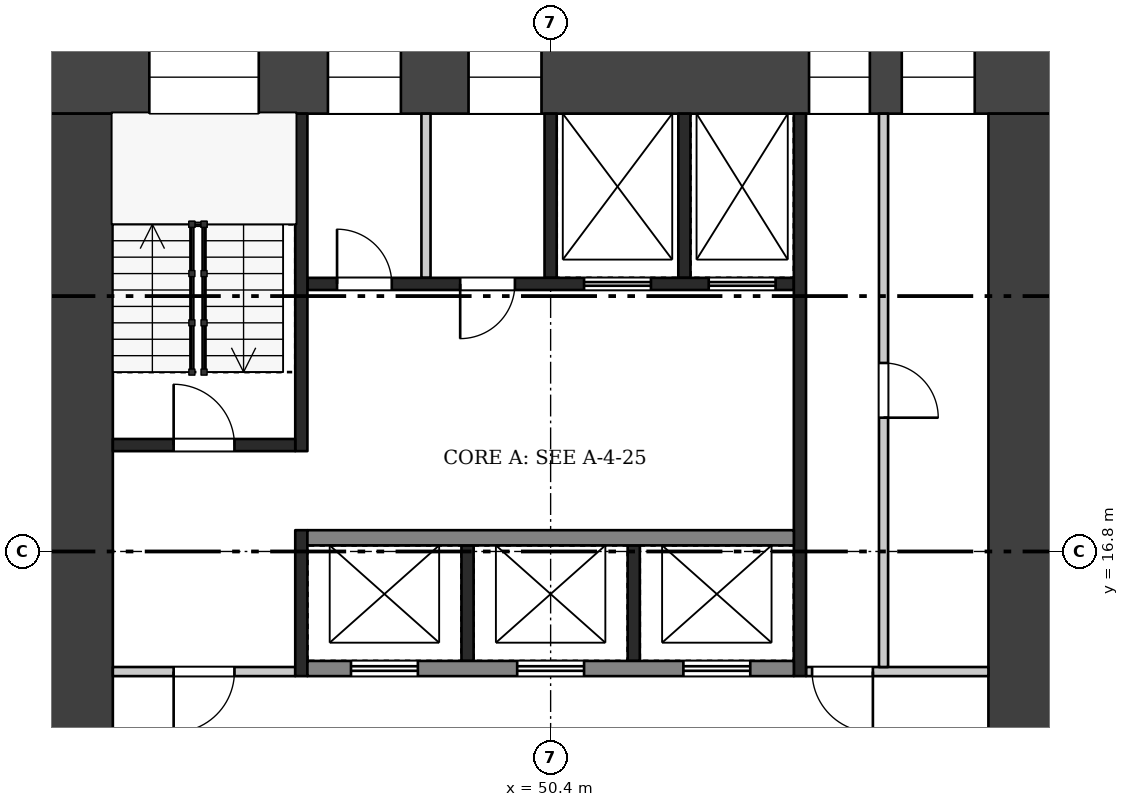
"""IFC4 building model, lengths in metres.
Left out: names, types, materials, properties, quantities, classifications, styles, units other than length and angle.
Written with IfcOpenShell. Run it as: python <this file> out.ifc"""

import sys

from ifc_helpers import new_model, si_unit, direction, frame, frame_2d, origin, place, context, subcontext, project, spatial, rectangle, extrude, element, fill, save


model = new_model("IFC4")
c1 = context("Model", 3, precision=1e-05, world=origin(), true_north=direction((0.0, 1.0)))
c2 = subcontext(c1, "Body", "Model", "MODEL_VIEW")
j1 = project(units=[si_unit("LENGTHUNIT", "METRE"), si_unit("PLANEANGLEUNIT", "RADIAN")], contexts=[c1])
p1 = place(None, origin())
s1 = spatial("IfcSite", under=j1, at=p1, CompositionType="ELEMENT")
p2 = place(p1, origin())
s2 = spatial("IfcBuilding", under=s1, at=p2, CompositionType="ELEMENT")
p3 = place(p2, frame((0.0, 0.0, 168.7)))
s3 = spatial("IfcBuildingStorey", under=s2, at=p3, CompositionType="ELEMENT", Elevation=168.7)
p4 = place(p3, frame((42.0, 24.6, 0.0), z_axis=(0.0, 0.0, 1.0), x_axis=(1.0, 0.0, 0.0)))
e1 = element("IfcWall", 1, at=p4, inside=s3, PredefinedType="SHEAR", context=c2, shape_type="SweptSolid", body=[
    extrude(rectangle(XDim=16.8, YDim=1.2, at=frame_2d((8.4, 0.0))), origin(), (0.0, 0.0, 1.0), 3.22),
])
p5 = place(p4, frame((1.8, 0.0, 0.5)))
e2 = element("IfcOpeningElement", 2, at=p5, cuts=e1, PredefinedType="OPENING", context=c2, shape_type="SweptSolid", body=[
    extrude(rectangle(XDim=1.8, YDim=2.4, at=frame_2d((0.9, 1.2))), frame((0.0, 0.61, 0.0), z_axis=(0.0, -1.0, 0.0), x_axis=(1.0, 0.0, 0.0)), (0.0, 0.0, 1.0), 1.22),
])
p6 = place(p4, frame((4.738, 0.0, 1.6)))
e3 = element("IfcOpeningElement", 3, at=p6, cuts=e1, PredefinedType="OPENING", context=c2, shape_type="SweptSolid", body=[
    extrude(rectangle(XDim=1.2, YDim=1.2, at=frame_2d((0.6, 0.6))), frame((0.0, 0.61, 0.0), z_axis=(0.0, -1.0, 0.0), x_axis=(1.0, 0.0, 0.0)), (0.0, 0.0, 1.0), 1.22),
])
p7 = place(p4, frame((7.05, 0.0, 1.6)))
e4 = element("IfcOpeningElement", 4, at=p7, cuts=e1, PredefinedType="OPENING", context=c2, shape_type="SweptSolid", body=[
    extrude(rectangle(XDim=1.2, YDim=1.2, at=frame_2d((0.6, 0.6))), frame((0.0, 0.61, 0.0), z_axis=(0.0, -1.0, 0.0), x_axis=(1.0, 0.0, 0.0)), (0.0, 0.0, 1.0), 1.22),
])
p8 = place(p4, frame((12.65, 0.0, 0.6)))
e5 = element("IfcOpeningElement", 5, at=p8, cuts=e1, PredefinedType="OPENING", context=c2, shape_type="SweptSolid", body=[
    extrude(rectangle(XDim=1.0, YDim=2.1, at=frame_2d((0.5, 1.05))), frame((0.0, 0.61, 0.0), z_axis=(0.0, -1.0, 0.0), x_axis=(1.0, 0.0, 0.0)), (0.0, 0.0, 1.0), 1.22),
])
p9 = place(p4, frame((14.175, 0.0, 1.6)))
e6 = element("IfcOpeningElement", 6, at=p9, cuts=e1, PredefinedType="OPENING", context=c2, shape_type="SweptSolid", body=[
    extrude(rectangle(XDim=1.2, YDim=1.2, at=frame_2d((0.6, 0.6))), frame((0.0, 0.61, 0.0), z_axis=(0.0, -1.0, 0.0), x_axis=(1.0, 0.0, 0.0)), (0.0, 0.0, 1.0), 1.22),
])
p10 = place(p3, frame((42.6, 9.6, 0.0), z_axis=(0.0, 0.0, 1.0), x_axis=(0.0, 1.0, 0.0)))
e7 = element("IfcWall", 7, at=p10, inside=s3, PredefinedType="SHEAR", context=c2, shape_type="SweptSolid", body=[
    extrude(rectangle(XDim=14.4, YDim=1.2, at=frame_2d((7.2, 0.0))), origin(), (0.0, 0.0, 1.0), 3.22),
])
p11 = place(p10, frame((2.1, 0.0, 0.0)))
e8 = element("IfcOpeningElement", 8, at=p11, cuts=e7, PredefinedType="OPENING", context=c2, shape_type="SweptSolid", body=[
    extrude(rectangle(XDim=1.8, YDim=2.1, at=frame_2d((0.9, 1.05))), frame((0.0, 0.61, 0.0), z_axis=(0.0, -1.0, 0.0), x_axis=(1.0, 0.0, 0.0)), (0.0, 0.0, 1.0), 1.22),
])
p12 = place(p3, frame((58.2, 9.6, 0.0), z_axis=(0.0, 0.0, 1.0), x_axis=(0.0, 1.0, 0.0)))
e9 = element("IfcWall", 9, at=p12, inside=s3, PredefinedType="SHEAR", context=c2, shape_type="SweptSolid", body=[
    extrude(rectangle(XDim=14.4, YDim=1.2, at=frame_2d((7.2, 0.0))), origin(), (0.0, 0.0, 1.0), 3.22),
])
p13 = place(p12, frame((2.1, 0.0, 0.0)))
e10 = element("IfcOpeningElement", 10, at=p13, cuts=e9, PredefinedType="OPENING", context=c2, shape_type="SweptSolid", body=[
    extrude(rectangle(XDim=1.8, YDim=2.1, at=frame_2d((0.9, 1.05))), frame((0.0, 0.61, 0.0), z_axis=(0.0, -1.0, 0.0), x_axis=(1.0, 0.0, 0.0)), (0.0, 0.0, 1.0), 1.22),
])
for number, where, z_axis, x_axis in (
    (11, (49.033, 15.0, 0.0), (0.0, 0.0, 1.0), (0.0, 1.0, 0.0)),
    (12, (51.767, 15.0, 0.0), (0.0, 0.0, 1.0), (0.0, 1.0, 0.0)),
):
    element("IfcWall", number, at=place(p3, frame(where, z_axis=z_axis, x_axis=x_axis)), inside=s3, PredefinedType="SHEAR", context=c2, shape_type="SweptSolid", body=[
        extrude(rectangle(XDim=1.9, YDim=0.2, at=frame_2d((0.95, 0.0))), origin(), (0.0, 0.0, 1.0), 3.22),
    ])
p14 = place(p3, frame((46.4, 14.875, 0.0), z_axis=(0.0, 0.0, 1.0), x_axis=(1.0, 0.0, 0.0)))
e13 = element("IfcWall", 13, at=p14, inside=s3, PredefinedType="SHEAR", context=c2, shape_type="SweptSolid", body=[
    extrude(rectangle(XDim=8.0, YDim=0.25, at=frame_2d((4.0, 0.0))), origin(), (0.0, 0.0, 1.0), 3.22),
])
p15 = place(p14, frame((0.717, 0.0, 0.0)))
e14 = element("IfcOpeningElement", 14, at=p15, cuts=e13, PredefinedType="OPENING", context=c2, shape_type="SweptSolid", body=[
    extrude(rectangle(XDim=1.1, YDim=2.1, at=frame_2d((0.55, 1.05))), frame((0.0, 0.135, 0.0), z_axis=(0.0, -1.0, 0.0), x_axis=(1.0, 0.0, 0.0)), (0.0, 0.0, 1.0), 0.27),
])
p16 = place(p14, frame((3.45, 0.0, 0.0)))
e15 = element("IfcOpeningElement", 15, at=p16, cuts=e13, PredefinedType="OPENING", context=c2, shape_type="SweptSolid", body=[
    extrude(rectangle(XDim=1.1, YDim=2.1, at=frame_2d((0.55, 1.05))), frame((0.0, 0.135, 0.0), z_axis=(0.0, -1.0, 0.0), x_axis=(1.0, 0.0, 0.0)), (0.0, 0.0, 1.0), 0.27),
])
p17 = place(p14, frame((6.183, 0.0, 0.0)))
e16 = element("IfcOpeningElement", 16, at=p17, cuts=e13, PredefinedType="OPENING", context=c2, shape_type="SweptSolid", body=[
    extrude(rectangle(XDim=1.1, YDim=2.1, at=frame_2d((0.55, 1.05))), frame((0.0, 0.135, 0.0), z_axis=(0.0, -1.0, 0.0), x_axis=(1.0, 0.0, 0.0)), (0.0, 0.0, 1.0), 0.27),
])
p18 = place(p3, frame((46.4, 17.025, 0.0), z_axis=(0.0, 0.0, 1.0), x_axis=(1.0, 0.0, 0.0)))
e17 = element("IfcWall", 17, at=p18, inside=s3, PredefinedType="SHEAR", context=c2, shape_type="SweptSolid", body=[
    extrude(rectangle(XDim=8.0, YDim=0.25, at=frame_2d((4.0, 0.0))), origin(), (0.0, 0.0, 1.0), 3.22),
])
for number, where, z_axis, x_axis in (
    (18, (50.4, 21.3, 0.0), (0.0, 0.0, 1.0), (0.0, 1.0, 0.0)),
    (19, (52.6, 21.3, 0.0), (0.0, 0.0, 1.0), (0.0, 1.0, 0.0)),
):
    element("IfcWall", number, at=place(p3, frame(where, z_axis=z_axis, x_axis=x_axis)), inside=s3, PredefinedType="SHEAR", context=c2, shape_type="SweptSolid", body=[
        extrude(rectangle(XDim=2.7, YDim=0.2, at=frame_2d((1.35, 0.0))), origin(), (0.0, 0.0, 1.0), 3.22),
    ])
p19 = place(p3, frame((48.35, 21.3, 0.0), z_axis=(0.0, 0.0, 1.0), x_axis=(0.0, 1.0, 0.0)))
e20 = element("IfcWall", 20, at=p19, inside=s3, PredefinedType="PARTITIONING", context=c2, shape_type="SweptSolid", body=[
    extrude(rectangle(XDim=2.7, YDim=0.15, at=frame_2d((1.35, 0.0))), origin(), (0.0, 0.0, 1.0), 3.22),
])
p20 = place(p3, frame((46.4, 21.2, 0.0), z_axis=(0.0, 0.0, 1.0), x_axis=(1.0, 0.0, 0.0)))
e21 = element("IfcWall", 21, at=p20, inside=s3, PredefinedType="SHEAR", context=c2, shape_type="SweptSolid", body=[
    extrude(rectangle(XDim=8.0, YDim=0.2, at=frame_2d((4.0, 0.0))), origin(), (0.0, 0.0, 1.0), 3.22),
])
p21 = place(p20, frame((0.488, 0.0, 0.0)))
e22 = element("IfcOpeningElement", 22, at=p21, cuts=e21, PredefinedType="OPENING", context=c2, shape_type="SweptSolid", body=[
    extrude(rectangle(XDim=0.9, YDim=2.1, at=frame_2d((0.45, 1.05))), frame((0.0, 0.11, 0.0), z_axis=(0.0, -1.0, 0.0), x_axis=(1.0, 0.0, 0.0)), (0.0, 0.0, 1.0), 0.22),
])
p22 = place(p20, frame((2.512, 0.0, 0.0)))
e23 = element("IfcOpeningElement", 23, at=p22, cuts=e21, PredefinedType="OPENING", context=c2, shape_type="SweptSolid", body=[
    extrude(rectangle(XDim=0.9, YDim=2.1, at=frame_2d((0.45, 1.05))), frame((0.0, 0.11, 0.0), z_axis=(0.0, -1.0, 0.0), x_axis=(1.0, 0.0, 0.0)), (0.0, 0.0, 1.0), 0.22),
])
p23 = place(p20, frame((4.55, 0.0, 0.0)))
e24 = element("IfcOpeningElement", 24, at=p23, cuts=e21, PredefinedType="OPENING", context=c2, shape_type="SweptSolid", body=[
    extrude(rectangle(XDim=1.1, YDim=2.1, at=frame_2d((0.55, 1.05))), frame((0.0, 0.11, 0.0), z_axis=(0.0, -1.0, 0.0), x_axis=(1.0, 0.0, 0.0)), (0.0, 0.0, 1.0), 0.22),
])
p24 = place(p20, frame((6.6, 0.0, 0.0)))
e25 = element("IfcOpeningElement", 25, at=p24, cuts=e21, PredefinedType="OPENING", context=c2, shape_type="SweptSolid", body=[
    extrude(rectangle(XDim=1.1, YDim=2.1, at=frame_2d((0.55, 1.05))), frame((0.0, 0.11, 0.0), z_axis=(0.0, -1.0, 0.0), x_axis=(1.0, 0.0, 0.0)), (0.0, 0.0, 1.0), 0.22),
])
p25 = place(p3, frame((46.3, 14.75, 0.0), z_axis=(0.0, 0.0, 1.0), x_axis=(0.0, 1.0, 0.0)))
e26 = element("IfcWall", 26, at=p25, inside=s3, PredefinedType="SHEAR", context=c2, shape_type="SweptSolid", body=[
    extrude(rectangle(XDim=2.4, YDim=0.2, at=frame_2d((1.2, 0.0))), origin(), (0.0, 0.0, 1.0), 3.22),
])
p26 = place(p3, frame((46.3, 18.45, 0.0), z_axis=(0.0, 0.0, 1.0), x_axis=(0.0, 1.0, 0.0)))
e27 = element("IfcWall", 27, at=p26, inside=s3, PredefinedType="SHEAR", context=c2, shape_type="SweptSolid", body=[
    extrude(rectangle(XDim=5.55, YDim=0.2, at=frame_2d((2.775, 0.0))), origin(), (0.0, 0.0, 1.0), 3.22),
])
p27 = place(p3, frame((43.2, 14.825, 0.0), z_axis=(0.0, 0.0, 1.0), x_axis=(1.0, 0.0, 0.0)))
e28 = element("IfcWall", 28, at=p27, inside=s3, PredefinedType="PARTITIONING", context=c2, shape_type="SweptSolid", body=[
    extrude(rectangle(XDim=3.0, YDim=0.15, at=frame_2d((1.5, 0.0))), origin(), (0.0, 0.0, 1.0), 3.22),
])
p28 = place(p27, frame((1.0, 0.0, 0.0)))
e29 = element("IfcOpeningElement", 29, at=p28, cuts=e28, PredefinedType="OPENING", context=c2, shape_type="SweptSolid", body=[
    extrude(rectangle(XDim=1.0, YDim=2.1, at=frame_2d((0.5, 1.05))), frame((0.0, 0.085, 0.0), z_axis=(0.0, -1.0, 0.0), x_axis=(1.0, 0.0, 0.0)), (0.0, 0.0, 1.0), 0.17),
])
p29 = place(p3, frame((43.2, 18.55, 0.0), z_axis=(0.0, 0.0, 1.0), x_axis=(1.0, 0.0, 0.0)))
e30 = element("IfcWall", 30, at=p29, inside=s3, PredefinedType="SHEAR", context=c2, shape_type="SweptSolid", body=[
    extrude(rectangle(XDim=3.0, YDim=0.2, at=frame_2d((1.5, 0.0))), origin(), (0.0, 0.0, 1.0), 3.22),
])
p30 = place(p29, frame((1.0, 0.0, 0.0)))
e31 = element("IfcOpeningElement", 31, at=p30, cuts=e30, PredefinedType="OPENING", context=c2, shape_type="SweptSolid", body=[
    extrude(rectangle(XDim=1.0, YDim=2.1, at=frame_2d((0.5, 1.05))), frame((0.0, 0.11, 0.0), z_axis=(0.0, -1.0, 0.0), x_axis=(1.0, 0.0, 0.0)), (0.0, 0.0, 1.0), 0.22),
])
p31 = place(p3, frame((54.5, 14.75, 0.0), z_axis=(0.0, 0.0, 1.0), x_axis=(0.0, 1.0, 0.0)))
e32 = element("IfcWall", 32, at=p31, inside=s3, PredefinedType="SHEAR", context=c2, shape_type="SweptSolid", body=[
    extrude(rectangle(XDim=9.25, YDim=0.2, at=frame_2d((4.625, 0.0))), origin(), (0.0, 0.0, 1.0), 3.22),
])
p32 = place(p3, frame((54.6, 14.825, 0.0), z_axis=(0.0, 0.0, 1.0), x_axis=(1.0, 0.0, 0.0)))
e33 = element("IfcWall", 33, at=p32, inside=s3, PredefinedType="PARTITIONING", context=c2, shape_type="SweptSolid", body=[
    extrude(rectangle(XDim=3.0, YDim=0.15, at=frame_2d((1.5, 0.0))), origin(), (0.0, 0.0, 1.0), 3.22),
])
p33 = place(p32, frame((0.1, 0.0, 0.0)))
e34 = element("IfcOpeningElement", 34, at=p33, cuts=e33, PredefinedType="OPENING", context=c2, shape_type="SweptSolid", body=[
    extrude(rectangle(XDim=1.0, YDim=2.1, at=frame_2d((0.5, 1.05))), frame((0.0, 0.085, 0.0), z_axis=(0.0, -1.0, 0.0), x_axis=(1.0, 0.0, 0.0)), (0.0, 0.0, 1.0), 0.17),
])
p34 = place(p3, frame((55.875, 14.9, 0.0), z_axis=(0.0, 0.0, 1.0), x_axis=(0.0, 1.0, 0.0)))
e35 = element("IfcWall", 35, at=p34, inside=s3, PredefinedType="PARTITIONING", context=c2, shape_type="SweptSolid", body=[
    extrude(rectangle(XDim=9.1, YDim=0.15, at=frame_2d((4.55, 0.0))), origin(), (0.0, 0.0, 1.0), 3.22),
])
p35 = place(p34, frame((4.1, 0.0, 0.0)))
e36 = element("IfcOpeningElement", 36, at=p35, cuts=e35, PredefinedType="OPENING", context=c2, shape_type="SweptSolid", body=[
    extrude(rectangle(XDim=0.9, YDim=2.1, at=frame_2d((0.45, 1.05))), frame((0.0, 0.085, 0.0), z_axis=(0.0, -1.0, 0.0), x_axis=(1.0, 0.0, 0.0)), (0.0, 0.0, 1.0), 0.17),
])
p36 = place(p15, origin())
e37 = element("IfcDoor", 37, at=p36, inside=s3, OperationType="DOUBLE_DOOR_SLIDING", PredefinedType="DOOR", context=c2, shape_type="SweptSolid", body=[
    extrude(rectangle(XDim=1.1, YDim=2.1, at=frame_2d((0.55, 1.05))), frame((0.0, 0.025, 0.0), z_axis=(0.0, -1.0, 0.0), x_axis=(1.0, 0.0, 0.0)), (0.0, 0.0, 1.0), 0.05),
])
fill(e14, e37)
p37 = place(p16, origin())
e38 = element("IfcDoor", 38, at=p37, inside=s3, OperationType="DOUBLE_DOOR_SLIDING", PredefinedType="DOOR", context=c2, shape_type="SweptSolid", body=[
    extrude(rectangle(XDim=1.1, YDim=2.1, at=frame_2d((0.55, 1.05))), frame((0.0, 0.025, 0.0), z_axis=(0.0, -1.0, 0.0), x_axis=(1.0, 0.0, 0.0)), (0.0, 0.0, 1.0), 0.05),
])
fill(e15, e38)
p38 = place(p17, origin())
e39 = element("IfcDoor", 39, at=p38, inside=s3, OperationType="DOUBLE_DOOR_SLIDING", PredefinedType="DOOR", context=c2, shape_type="SweptSolid", body=[
    extrude(rectangle(XDim=1.1, YDim=2.1, at=frame_2d((0.55, 1.05))), frame((0.0, 0.025, 0.0), z_axis=(0.0, -1.0, 0.0), x_axis=(1.0, 0.0, 0.0)), (0.0, 0.0, 1.0), 0.05),
])
fill(e16, e39)
p39 = place(p21, origin())
e40 = element("IfcDoor", 40, at=p39, inside=s3, OperationType="SINGLE_SWING_LEFT", PredefinedType="DOOR", context=c2, shape_type="SweptSolid", body=[
    extrude(rectangle(XDim=0.9, YDim=2.1, at=frame_2d((0.45, 1.05))), frame((0.0, 0.025, 0.0), z_axis=(0.0, -1.0, 0.0), x_axis=(1.0, 0.0, 0.0)), (0.0, 0.0, 1.0), 0.05),
])
fill(e22, e40)
p40 = place(p22, frame((0.9, 0.0, 0.0), z_axis=(0.0, 0.0, 1.0), x_axis=(-1.0, 0.0, 0.0)))
e41 = element("IfcDoor", 41, at=p40, inside=s3, OperationType="SINGLE_SWING_RIGHT", PredefinedType="DOOR", context=c2, shape_type="SweptSolid", body=[
    extrude(rectangle(XDim=0.9, YDim=2.1, at=frame_2d((0.45, 1.05))), frame((0.0, 0.025, 0.0), z_axis=(0.0, -1.0, 0.0), x_axis=(1.0, 0.0, 0.0)), (0.0, 0.0, 1.0), 0.05),
])
fill(e23, e41)
p41 = place(p23, origin())
e42 = element("IfcDoor", 42, at=p41, inside=s3, OperationType="DOUBLE_DOOR_SLIDING", PredefinedType="DOOR", context=c2, shape_type="SweptSolid", body=[
    extrude(rectangle(XDim=1.1, YDim=2.1, at=frame_2d((0.55, 1.05))), frame((0.0, 0.025, 0.0), z_axis=(0.0, -1.0, 0.0), x_axis=(1.0, 0.0, 0.0)), (0.0, 0.0, 1.0), 0.05),
])
fill(e24, e42)
p42 = place(p24, origin())
e43 = element("IfcDoor", 43, at=p42, inside=s3, OperationType="DOUBLE_DOOR_SLIDING", PredefinedType="DOOR", context=c2, shape_type="SweptSolid", body=[
    extrude(rectangle(XDim=1.1, YDim=2.1, at=frame_2d((0.55, 1.05))), frame((0.0, 0.025, 0.0), z_axis=(0.0, -1.0, 0.0), x_axis=(1.0, 0.0, 0.0)), (0.0, 0.0, 1.0), 0.05),
])
fill(e25, e43)
p43 = place(p28, frame((1.0, 0.0, 0.0), z_axis=(0.0, 0.0, 1.0), x_axis=(-1.0, 0.0, 0.0)))
e44 = element("IfcDoor", 44, at=p43, inside=s3, OperationType="SINGLE_SWING_RIGHT", PredefinedType="DOOR", context=c2, shape_type="SweptSolid", body=[
    extrude(rectangle(XDim=1.0, YDim=2.1, at=frame_2d((0.5, 1.05))), frame((0.0, 0.025, 0.0), z_axis=(0.0, -1.0, 0.0), x_axis=(1.0, 0.0, 0.0)), (0.0, 0.0, 1.0), 0.05),
])
fill(e29, e44)
p44 = place(p30, origin())
e45 = element("IfcDoor", 45, at=p44, inside=s3, OperationType="SINGLE_SWING_LEFT", PredefinedType="DOOR", context=c2, shape_type="SweptSolid", body=[
    extrude(rectangle(XDim=1.0, YDim=2.1, at=frame_2d((0.5, 1.05))), frame((0.0, 0.025, 0.0), z_axis=(0.0, -1.0, 0.0), x_axis=(1.0, 0.0, 0.0)), (0.0, 0.0, 1.0), 0.05),
])
fill(e31, e45)
p45 = place(p33, frame((1.0, 0.0, 0.0), z_axis=(0.0, 0.0, 1.0), x_axis=(-1.0, 0.0, 0.0)))
e46 = element("IfcDoor", 46, at=p45, inside=s3, OperationType="SINGLE_SWING_LEFT", PredefinedType="DOOR", context=c2, shape_type="SweptSolid", body=[
    extrude(rectangle(XDim=1.0, YDim=2.1, at=frame_2d((0.5, 1.05))), frame((0.0, 0.025, 0.0), z_axis=(0.0, -1.0, 0.0), x_axis=(1.0, 0.0, 0.0)), (0.0, 0.0, 1.0), 0.05),
])
fill(e34, e46)
p46 = place(p35, frame((0.9, 0.0, 0.0), z_axis=(0.0, 0.0, 1.0), x_axis=(-1.0, 0.0, 0.0)))
e47 = element("IfcDoor", 47, at=p46, inside=s3, OperationType="SINGLE_SWING_RIGHT", PredefinedType="DOOR", context=c2, shape_type="SweptSolid", body=[
    extrude(rectangle(XDim=0.9, YDim=2.1, at=frame_2d((0.45, 1.05))), frame((0.0, 0.025, 0.0), z_axis=(0.0, -1.0, 0.0), x_axis=(1.0, 0.0, 0.0)), (0.0, 0.0, 1.0), 0.05),
])
fill(e36, e47)
p47 = place(p5, origin())
e48 = element("IfcWindow", 48, at=p47, inside=s3, PartitioningType="SINGLE_PANEL", PredefinedType="WINDOW", context=c2, shape_type="SweptSolid", body=[
    extrude(rectangle(XDim=1.8, YDim=2.4, at=frame_2d((0.9, 1.2))), frame((0.0, 0.03, 0.0), z_axis=(0.0, -1.0, 0.0), x_axis=(1.0, 0.0, 0.0)), (0.0, 0.0, 1.0), 0.06),
])
fill(e2, e48)
p48 = place(p6, origin())
e49 = element("IfcWindow", 49, at=p48, inside=s3, PartitioningType="SINGLE_PANEL", PredefinedType="WINDOW", context=c2, shape_type="SweptSolid", body=[
    extrude(rectangle(XDim=1.2, YDim=1.2, at=frame_2d((0.6, 0.6))), frame((0.0, 0.03, 0.0), z_axis=(0.0, -1.0, 0.0), x_axis=(1.0, 0.0, 0.0)), (0.0, 0.0, 1.0), 0.06),
])
fill(e3, e49)
p49 = place(p7, origin())
e50 = element("IfcWindow", 50, at=p49, inside=s3, PartitioningType="SINGLE_PANEL", PredefinedType="WINDOW", context=c2, shape_type="SweptSolid", body=[
    extrude(rectangle(XDim=1.2, YDim=1.2, at=frame_2d((0.6, 0.6))), frame((0.0, 0.03, 0.0), z_axis=(0.0, -1.0, 0.0), x_axis=(1.0, 0.0, 0.0)), (0.0, 0.0, 1.0), 0.06),
])
fill(e4, e50)
p50 = place(p8, origin())
e51 = element("IfcWindow", 51, at=p50, inside=s3, PartitioningType="SINGLE_PANEL", PredefinedType="WINDOW", context=c2, shape_type="SweptSolid", body=[
    extrude(rectangle(XDim=1.0, YDim=2.1, at=frame_2d((0.5, 1.05))), frame((0.0, 0.03, 0.0), z_axis=(0.0, -1.0, 0.0), x_axis=(1.0, 0.0, 0.0)), (0.0, 0.0, 1.0), 0.06),
])
fill(e5, e51)
p51 = place(p9, origin())
e52 = element("IfcWindow", 52, at=p51, inside=s3, PartitioningType="SINGLE_PANEL", PredefinedType="WINDOW", context=c2, shape_type="SweptSolid", body=[
    extrude(rectangle(XDim=1.2, YDim=1.2, at=frame_2d((0.6, 0.6))), frame((0.0, 0.03, 0.0), z_axis=(0.0, -1.0, 0.0), x_axis=(1.0, 0.0, 0.0)), (0.0, 0.0, 1.0), 0.06),
])
fill(e6, e52)
save(model, sys.argv[1])
